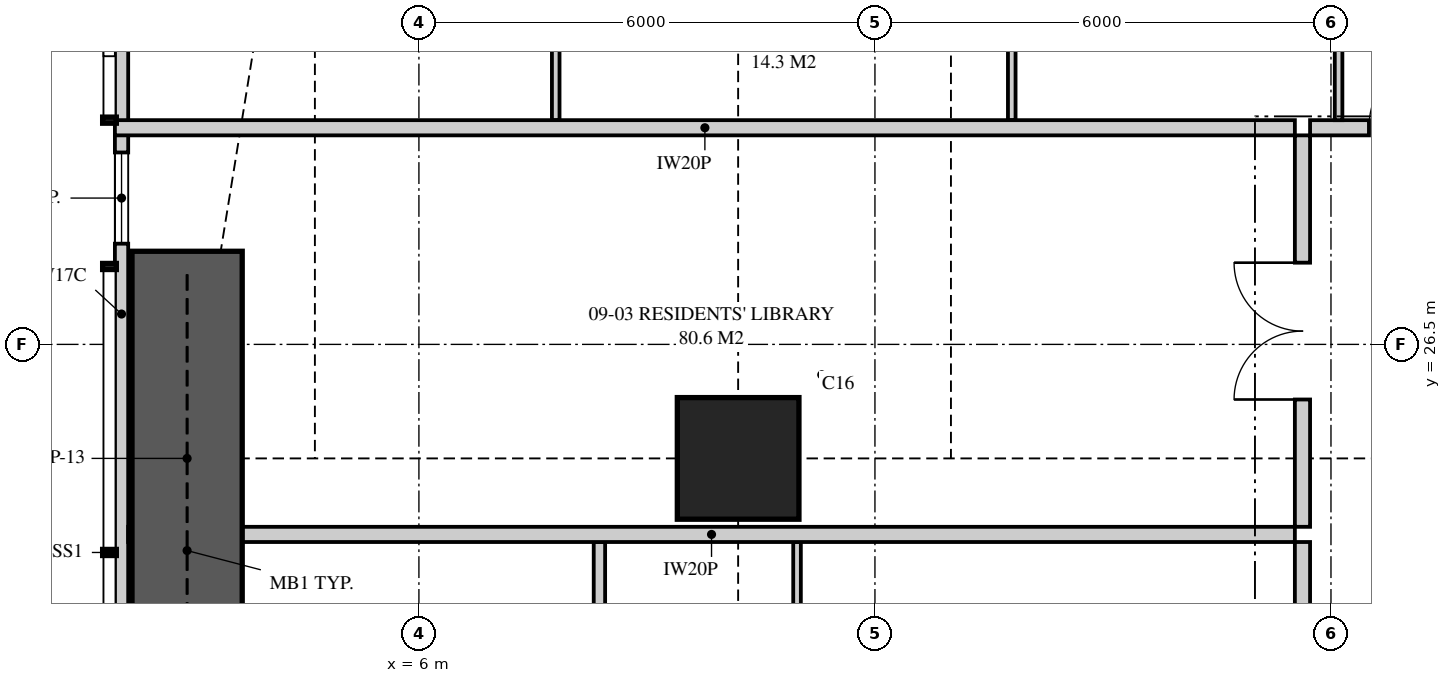
"""IFC4 building model, lengths in metres.
Left out: names, types, materials, properties, quantities, classifications, styles, units other than length and angle.
Written with IfcOpenShell. Run it as: python <this file> out.ifc"""

import sys

from ifc_helpers import new_model, si_unit, direction, frame, frame_2d, origin, origin_2d, place, context, subcontext, project, spatial, polyline, rectangle, outline, extrude, element, fill, save


model = new_model("IFC4")
c1 = context("Model", 3, precision=1e-05, world=origin(), true_north=direction((0.0, 1.0)))
c2 = subcontext(c1, "Body", "Model", "MODEL_VIEW")
j1 = project(units=[si_unit("LENGTHUNIT", "METRE"), si_unit("PLANEANGLEUNIT", "RADIAN")], contexts=[c1])
p1 = place(None, origin())
s1 = spatial("IfcSite", under=j1, at=p1, CompositionType="ELEMENT")
p2 = place(p1, origin())
s2 = spatial("IfcBuilding", under=s1, at=p2, CompositionType="ELEMENT")
p3 = place(p2, frame((0.0, 0.0, 37.75)))
s3 = spatial("IfcBuildingStorey", under=s2, at=p3, CompositionType="ELEMENT", Elevation=37.75)
p4 = place(p3, frame((10.2, 25.0, 0.0), z_axis=(0.0, 0.0, 1.0), x_axis=(1.0, 0.0, 0.0)))
e1 = element("IfcColumn", 1, at=p4, inside=s3, PredefinedType="COLUMN", context=c2, shape_type="SweptSolid", body=[
    extrude(rectangle(XDim=1.6, YDim=1.6, at=origin_2d()), origin(), (0.0, 0.0, 1.0), 3.35),
])
p5 = place(p3, frame((2.087, 34.949, 0.0), z_axis=(0.0, 0.0, 1.0), x_axis=(0.0, -1.0, 0.0)))
e2 = element("IfcWall", 2, at=p5, inside=s3, PredefinedType="SOLIDWALL", context=c2, shape_type="SweptSolid", body=[
    extrude(outline(polyline([(0.0, 0.0), (16.099, 0.0), (16.099, 2.15), (9.949, 2.15), (9.949, 3.11), (9.823, 3.11), (9.823, 2.15), (9.73, 2.15), (9.73, 3.11), (0.0, 3.11), (0.0, 0.0)])), frame((0.0, 0.087, 0.0), z_axis=(0.0, -1.0, 0.0), x_axis=(1.0, 0.0, 0.0)), (0.0, 0.0, 1.0), 0.175),
])
p6 = place(p5, frame((2.757, 0.0, 0.4)))
e3 = element("IfcOpeningElement", 3, at=p6, cuts=e2, PredefinedType="OPENING", context=c2, shape_type="SweptSolid", body=[
    extrude(rectangle(XDim=1.8, YDim=1.7, at=frame_2d((0.9, 0.85))), frame((0.0, 0.097, 0.0), z_axis=(0.0, -1.0, 0.0), x_axis=(1.0, 0.0, 0.0)), (0.0, 0.0, 1.0), 0.195),
])
p7 = place(p5, frame((5.924, 0.0, 0.4)))
e4 = element("IfcOpeningElement", 4, at=p7, cuts=e2, PredefinedType="OPENING", context=c2, shape_type="SweptSolid", body=[
    extrude(rectangle(XDim=1.2, YDim=1.7, at=frame_2d((0.6, 0.85))), frame((0.0, 0.097, 0.0), z_axis=(0.0, -1.0, 0.0), x_axis=(1.0, 0.0, 0.0)), (0.0, 0.0, 1.0), 0.195),
])
p8 = place(p5, frame((12.799, 0.0, 0.4)))
e5 = element("IfcOpeningElement", 5, at=p8, cuts=e2, PredefinedType="OPENING", context=c2, shape_type="SweptSolid", body=[
    extrude(rectangle(XDim=1.8, YDim=1.7, at=frame_2d((0.9, 0.85))), frame((0.0, 0.097, 0.0), z_axis=(0.0, -1.0, 0.0), x_axis=(1.0, 0.0, 0.0)), (0.0, 0.0, 1.0), 0.195),
])
p9 = place(p3, frame((17.725, 29.35, 0.0), z_axis=(0.0, 0.0, 1.0), x_axis=(1.0, 0.0, 0.0)))
e6 = element("IfcWall", 6, at=p9, inside=s3, PredefinedType="PARTITIONING", context=c2, shape_type="SweptSolid", body=[
    extrude(rectangle(XDim=5.375, YDim=0.2, at=frame_2d((2.688, 0.0))), origin(), (0.0, 0.0, 1.0), 3.11),
])
p10 = place(p9, frame((0.775, 0.0, 0.0)))
e7 = element("IfcOpeningElement", 7, at=p10, cuts=e6, PredefinedType="OPENING", context=c2, shape_type="SweptSolid", body=[
    extrude(rectangle(XDim=1.05, YDim=2.2, at=frame_2d((0.525, 1.1))), frame((0.0, 0.11, 0.0), z_axis=(0.0, -1.0, 0.0), x_axis=(1.0, 0.0, 0.0)), (0.0, 0.0, 1.0), 0.22),
])
p11 = place(p3, frame((7.8, 37.825, 0.0), z_axis=(0.0, 0.0, 1.0), x_axis=(0.0, -1.0, 0.0)))
e8 = element("IfcWall", 8, at=p11, inside=s3, PredefinedType="PARTITIONING", context=c2, shape_type="SweptSolid", body=[
    extrude(outline(polyline([(0.0, 0.0), (8.375, 0.0), (8.375, 3.11), (2.697, 3.11), (2.697, 2.15), (0.943, 2.15), (0.943, 3.11), (0.0, 3.11), (0.0, 0.0)])), frame((0.0, 0.05, 0.0), z_axis=(0.0, -1.0, 0.0), x_axis=(1.0, 0.0, 0.0)), (0.0, 0.0, 1.0), 0.1),
])
p12 = place(p11, frame((2.842, 0.0, 0.0)))
e9 = element("IfcOpeningElement", 9, at=p12, cuts=e8, PredefinedType="OPENING", context=c2, shape_type="SweptSolid", body=[
    extrude(rectangle(XDim=0.9, YDim=2.1, at=frame_2d((0.45, 1.05))), frame((0.0, 0.06, 0.0), z_axis=(0.0, -1.0, 0.0), x_axis=(1.0, 0.0, 0.0)), (0.0, 0.0, 1.0), 0.12),
])
p13 = place(p11, frame((6.059, 0.0, 0.0)))
e10 = element("IfcOpeningElement", 10, at=p13, cuts=e8, PredefinedType="OPENING", context=c2, shape_type="SweptSolid", body=[
    extrude(rectangle(XDim=0.9, YDim=2.1, at=frame_2d((0.45, 1.05))), frame((0.0, 0.06, 0.0), z_axis=(0.0, -1.0, 0.0), x_axis=(1.0, 0.0, 0.0)), (0.0, 0.0, 1.0), 0.12),
])
p14 = place(p3, frame((13.8, 37.825, 0.0), z_axis=(0.0, 0.0, 1.0), x_axis=(0.0, -1.0, 0.0)))
e11 = element("IfcWall", 11, at=p14, inside=s3, PredefinedType="PARTITIONING", context=c2, shape_type="SweptSolid", body=[
    extrude(outline(polyline([(1.635, 2.15), (0.0, 2.15), (0.0, 0.0), (8.375, 0.0), (8.375, 3.11), (1.635, 3.11), (1.635, 2.15)]), holes=[polyline([(1.021, 0.126), (0.529, 0.126), (0.529, 0.919), (1.021, 0.919), (1.021, 0.126)]), polyline([(1.021, 1.231), (0.529, 1.231), (0.529, 2.024), (1.021, 2.024), (1.021, 1.231)])]), frame((0.0, 0.05, 0.0), z_axis=(0.0, -1.0, 0.0), x_axis=(1.0, 0.0, 0.0)), (0.0, 0.0, 1.0), 0.1),
])
p15 = place(p14, frame((4.525, 0.0, 0.0)))
e12 = element("IfcOpeningElement", 12, at=p15, cuts=e11, PredefinedType="OPENING", context=c2, shape_type="SweptSolid", body=[
    extrude(rectangle(XDim=0.9, YDim=2.1, at=frame_2d((0.45, 1.05))), frame((0.0, 0.06, 0.0), z_axis=(0.0, -1.0, 0.0), x_axis=(1.0, 0.0, 0.0)), (0.0, 0.0, 1.0), 0.12),
])
p16 = place(p3, frame((18.1, 37.825, 0.0), z_axis=(0.0, 0.0, 1.0), x_axis=(0.0, -1.0, 0.0)))
e13 = element("IfcWall", 13, at=p16, inside=s3, PredefinedType="PARTITIONING", context=c2, shape_type="SweptSolid", body=[
    extrude(outline(polyline([(0.0, 0.0), (8.375, 0.0), (8.375, 3.11), (1.635, 3.11), (1.635, 2.15), (0.0, 2.15), (0.0, 3.11), (0.0, 0.0)])), frame((0.0, 0.05, 0.0), z_axis=(0.0, -1.0, 0.0), x_axis=(1.0, 0.0, 0.0)), (0.0, 0.0, 1.0), 0.1),
])
p17 = place(p16, frame((4.525, 0.0, 0.0)))
e14 = element("IfcOpeningElement", 14, at=p17, cuts=e13, PredefinedType="OPENING", context=c2, shape_type="SweptSolid", body=[
    extrude(rectangle(XDim=0.9, YDim=2.1, at=frame_2d((0.45, 1.05))), frame((0.0, 0.06, 0.0), z_axis=(0.0, -1.0, 0.0), x_axis=(1.0, 0.0, 0.0)), (0.0, 0.0, 1.0), 0.12),
])
p18 = place(p16, frame((5.95, 0.0, 0.0)))
e15 = element("IfcOpeningElement", 15, at=p18, cuts=e13, PredefinedType="OPENING", context=c2, shape_type="SweptSolid", body=[
    extrude(rectangle(XDim=0.9, YDim=2.1, at=frame_2d((0.45, 1.05))), frame((0.0, 0.06, 0.0), z_axis=(0.0, -1.0, 0.0), x_axis=(1.0, 0.0, 0.0)), (0.0, 0.0, 1.0), 0.12),
])
p19 = place(p3, frame((2.0, 29.35, 0.0), z_axis=(0.0, 0.0, 1.0), x_axis=(1.0, 0.0, 0.0)))
e16 = element("IfcWall", 16, at=p19, inside=s3, PredefinedType="PARTITIONING", context=c2, shape_type="SweptSolid", body=[
    extrude(outline(polyline([(0.0, 0.0), (15.525, 0.0), (15.525, 3.11), (11.337, 3.11), (11.337, 2.541), (10.663, 2.541), (10.663, 3.11), (9.51, 3.11), (9.51, 2.51), (6.89, 2.51), (6.89, 3.11), (2.969, 3.11), (2.969, 2.541), (2.577, 2.541), (2.577, 2.15), (0.733, 2.15), (0.733, 3.11), (0.0, 3.11), (0.0, 0.0)])), frame((0.0, 0.1, 0.0), z_axis=(0.0, -1.0, 0.0), x_axis=(1.0, 0.0, 0.0)), (0.0, 0.0, 1.0), 0.2),
])
p20 = place(p3, frame((2.175, 24.0, 0.0), z_axis=(0.0, 0.0, 1.0), x_axis=(1.0, 0.0, 0.0)))
e17 = element("IfcWall", 17, at=p20, inside=s3, PredefinedType="PARTITIONING", context=c2, shape_type="SweptSolid", body=[
    extrude(outline(polyline([(0.529, 2.15), (0.0, 2.15), (0.0, 0.0), (0.529, 0.0), (0.529, 0.815), (1.021, 0.815), (1.021, 0.0), (15.35, 0.0), (15.35, 3.11), (9.335, 3.11), (9.335, 2.51), (6.715, 2.51), (6.715, 3.11), (1.685, 3.11), (1.685, 2.15), (1.021, 2.15), (1.021, 1.335), (0.529, 1.335), (0.529, 2.15)])), frame((0.0, 0.1, 0.0), z_axis=(0.0, -1.0, 0.0), x_axis=(1.0, 0.0, 0.0)), (0.0, 0.0, 1.0), 0.2),
])
p21 = place(p3, frame((17.625, 14.1, 0.0), z_axis=(0.0, 0.0, 1.0), x_axis=(0.0, 1.0, 0.0)))
e18 = element("IfcWall", 18, at=p21, inside=s3, PredefinedType="PARTITIONING", context=c2, shape_type="SweptSolid", body=[
    extrude(rectangle(XDim=9.8, YDim=0.2, at=frame_2d((4.9, 0.0))), origin(), (0.0, 0.0, 1.0), 3.11),
])
p22 = place(p21, frame((4.4, 0.0, 0.0)))
e19 = element("IfcOpeningElement", 19, at=p22, cuts=e18, PredefinedType="OPENING", context=c2, shape_type="SweptSolid", body=[
    extrude(rectangle(XDim=1.05, YDim=2.2, at=frame_2d((0.525, 1.1))), frame((0.0, 0.11, 0.0), z_axis=(0.0, -1.0, 0.0), x_axis=(1.0, 0.0, 0.0)), (0.0, 0.0, 1.0), 0.22),
])
p23 = place(p3, frame((8.375, 20.0, 0.0), z_axis=(0.0, 0.0, 1.0), x_axis=(0.0, 1.0, 0.0)))
e20 = element("IfcWall", 20, at=p23, inside=s3, PredefinedType="PLUMBINGWALL", context=c2, shape_type="SweptSolid", body=[
    extrude(rectangle(XDim=3.9, YDim=0.15, at=frame_2d((1.95, 0.0))), origin(), (0.0, 0.0, 1.0), 3.11),
])
p24 = place(p23, frame((0.4, 0.0, 0.0)))
e21 = element("IfcOpeningElement", 21, at=p24, cuts=e20, PredefinedType="OPENING", context=c2, shape_type="SweptSolid", body=[
    extrude(rectangle(XDim=0.9, YDim=2.1, at=frame_2d((0.45, 1.05))), frame((0.0, 0.085, 0.0), z_axis=(0.0, -1.0, 0.0), x_axis=(1.0, 0.0, 0.0)), (0.0, 0.0, 1.0), 0.17),
])
p25 = place(p3, frame((10.975, 20.0, 0.0), z_axis=(0.0, 0.0, 1.0), x_axis=(0.0, 1.0, 0.0)))
e22 = element("IfcWall", 22, at=p25, inside=s3, PredefinedType="PARTITIONING", context=c2, shape_type="SweptSolid", body=[
    extrude(outline(polyline([(0.0, 0.0), (3.9, 0.0), (3.9, 3.11), (3.9, 2.51), (0.0, 2.51), (0.0, 3.11), (0.0, 0.0)])), frame((0.0, 0.05, 0.0), z_axis=(0.0, -1.0, 0.0), x_axis=(1.0, 0.0, 0.0)), (0.0, 0.0, 1.0), 0.1),
])
p26 = place(p3, frame((17.625, 24.1, 0.0), z_axis=(0.0, 0.0, 1.0), x_axis=(0.0, 1.0, 0.0)))
e23 = element("IfcWall", 23, at=p26, inside=s3, PredefinedType="PARTITIONING", context=c2, shape_type="SweptSolid", body=[
    extrude(outline(polyline([(0.0, 0.0), (5.15, 0.0), (5.15, 3.11), (1.237, 3.11), (1.237, 2.541), (0.562, 2.541), (0.562, 3.11), (0.0, 3.11), (0.0, 0.0)])), frame((0.0, 0.1, 0.0), z_axis=(0.0, -1.0, 0.0), x_axis=(1.0, 0.0, 0.0)), (0.0, 0.0, 1.0), 0.2),
])
p27 = place(p26, frame((1.675, 0.0, 0.0)))
e24 = element("IfcOpeningElement", 24, at=p27, cuts=e23, PredefinedType="OPENING", context=c2, shape_type="SweptSolid", body=[
    extrude(rectangle(XDim=1.8, YDim=2.1, at=frame_2d((0.9, 1.05))), frame((0.0, 0.11, 0.0), z_axis=(0.0, -1.0, 0.0), x_axis=(1.0, 0.0, 0.0)), (0.0, 0.0, 1.0), 0.22),
])
p28 = place(p3, frame((2.95, 22.275, 0.0), z_axis=(0.0, 0.0, 1.0), x_axis=(0.0, 1.0, 0.0)))
e25 = element("IfcWall", 25, at=p28, inside=s3, PredefinedType="SHEAR", context=c2, shape_type="SweptSolid", body=[
    extrude(rectangle(XDim=5.45, YDim=1.45, at=frame_2d((2.725, 0.0))), origin(), (0.0, 0.0, 1.0), 3.35),
])
p29 = place(p7, origin())
e26 = element("IfcWindow", 26, at=p29, inside=s3, PartitioningType="SINGLE_PANEL", PredefinedType="WINDOW", context=c2, shape_type="SweptSolid", body=[
    extrude(rectangle(XDim=1.2, YDim=1.7, at=frame_2d((0.6, 0.85))), frame((0.0, 0.03, 0.0), z_axis=(0.0, -1.0, 0.0), x_axis=(1.0, 0.0, 0.0)), (0.0, 0.0, 1.0), 0.06),
])
fill(e4, e26)
p30 = place(p10, origin())
e27 = element("IfcDoor", 27, at=p30, inside=s3, OperationType="SINGLE_SWING_RIGHT", PredefinedType="DOOR", context=c2, shape_type="SweptSolid", body=[
    extrude(rectangle(XDim=1.05, YDim=2.2, at=frame_2d((0.525, 1.1))), frame((0.0, 0.025, 0.0), z_axis=(0.0, -1.0, 0.0), x_axis=(1.0, 0.0, 0.0)), (0.0, 0.0, 1.0), 0.05),
])
fill(e7, e27)
p31 = place(p27, origin())
e28 = element("IfcDoor", 28, at=p31, inside=s3, OperationType="DOUBLE_DOOR_SINGLE_SWING", PredefinedType="DOOR", context=c2, shape_type="SweptSolid", body=[
    extrude(rectangle(XDim=1.8, YDim=2.1, at=frame_2d((0.9, 1.05))), frame((0.0, 0.025, 0.0), z_axis=(0.0, -1.0, 0.0), x_axis=(1.0, 0.0, 0.0)), (0.0, 0.0, 1.0), 0.05),
])
fill(e24, e28)
save(model, sys.argv[1])
